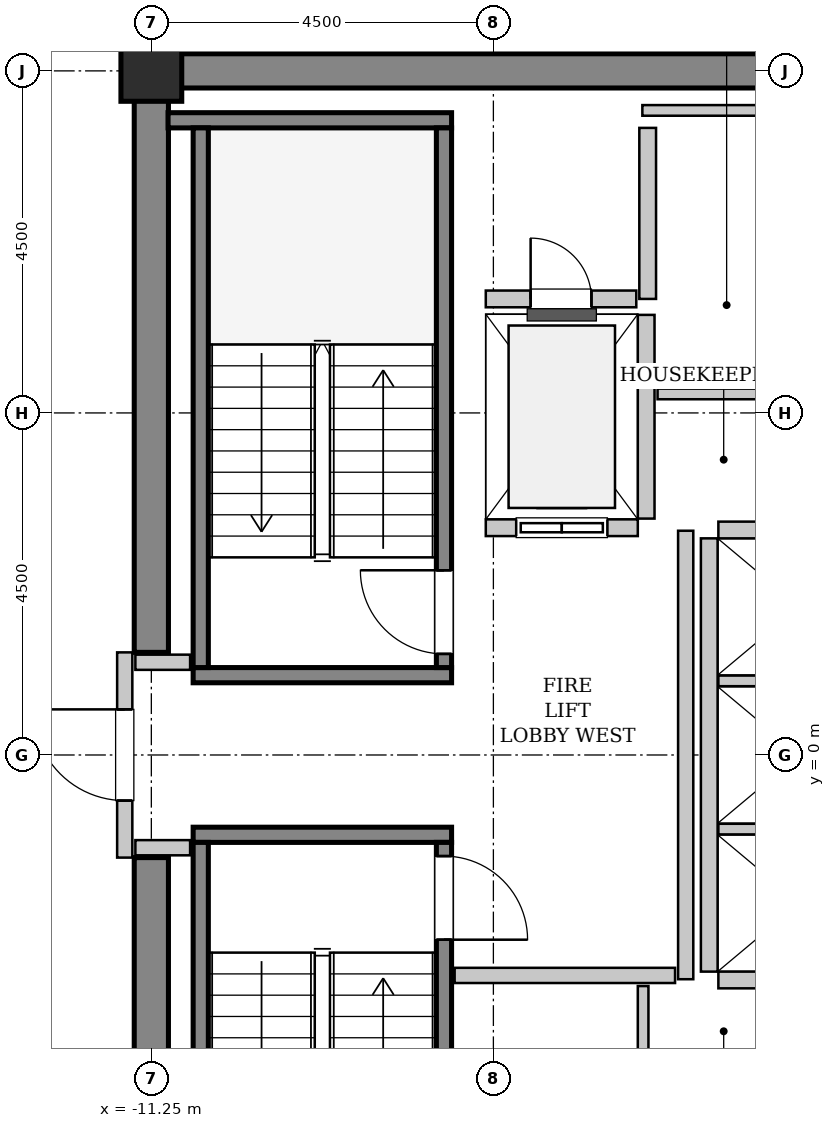
"""IFC4 building model, lengths in metres.
Left out: names, types, materials, properties, quantities, classifications, styles, units other than length and angle.
Written with IfcOpenShell. Run it as: python <this file> out.ifc"""

import sys

from ifc_helpers import new_model, si_unit, direction, frame, frame_2d, origin, origin_2d, place, context, subcontext, project, spatial, rectangle, hollow_rectangle, extrude, source, transform, mapped, element, fill, save


model = new_model("IFC4")
c1 = context("Model", 3, precision=1e-05, world=origin(), true_north=direction((0.0, 1.0)))
c2 = subcontext(c1, "Body", "Model", "MODEL_VIEW")
j1 = project(units=[si_unit("LENGTHUNIT", "METRE"), si_unit("PLANEANGLEUNIT", "RADIAN")], contexts=[c1])
p1 = place(None, origin())
s1 = spatial("IfcSite", under=j1, at=p1, CompositionType="ELEMENT")
p2 = place(p1, origin())
s2 = spatial("IfcBuilding", under=s1, at=p2, CompositionType="ELEMENT")
p3 = place(p2, frame((0.0, 0.0, 248.4)))
s3 = spatial("IfcBuildingStorey", under=s2, at=p3, CompositionType="ELEMENT", Elevation=248.4)
m1 = source(origin(), c2, "Body", "SweptSolid", [
    extrude(rectangle(XDim=9.925, YDim=0.45, at=frame_2d((4.962, 0.0))), origin(), (0.0, 0.0, 1.0), 3.8),
])
p4 = place(p3, frame((-11.475, 9.0, 0.0), z_axis=(0.0, 0.0, 1.0), x_axis=(1.0, 0.0, 0.0)))
e1 = element("IfcWall", 1, at=p4, inside=s3, PredefinedType="SHEAR", context=c2, shape_type="MappedRepresentation", body=[
    mapped(m1, transform((0.0, 0.0, 0.0), x_axis=(1.0, 0.0, 0.0), y_axis=(0.0, 1.0, 0.0), z_axis=(0.0, 0.0, 1.0), scale=1.0)),
])
m2 = source(origin(), c2, "Body", "SweptSolid", [
    extrude(rectangle(XDim=7.425, YDim=0.45, at=frame_2d((3.712, 0.0))), origin(), (0.0, 0.0, 1.0), 3.8),
])
for number, where, z_axis, x_axis in (
    (2, (-11.25, -8.775, 0.0), (0.0, 0.0, 1.0), (0.0, 1.0, 0.0)),
    (3, (-11.25, 1.35, 0.0), (0.0, 0.0, 1.0), (0.0, 1.0, 0.0)),
):
    element("IfcWall", number, at=place(p3, frame(where, z_axis=z_axis, x_axis=x_axis)), inside=s3, PredefinedType="SHEAR", context=c2, shape_type="MappedRepresentation", body=[
        mapped(m2, transform((0.0, 0.0, 0.0), x_axis=(1.0, 0.0, 0.0), y_axis=(0.0, 1.0, 0.0), z_axis=(0.0, 0.0, 1.0), scale=1.0)),
    ])
m3 = source(origin(), c2, "Body", "SweptSolid", [
    extrude(hollow_rectangle(XDim=0.8, YDim=0.8, WallThickness=0.04, InnerFilletRadius=0.04, OuterFilletRadius=0.08, at=origin_2d()), origin(), (0.0, 0.0, 1.0), 3.8),
])
p5 = place(p3, frame((-11.25, 9.0, 0.0), z_axis=(0.0, 0.0, 1.0), x_axis=(1.0, 0.0, 0.0)))
e4 = element("IfcColumn", 4, at=p5, inside=s3, PredefinedType="COLUMN", context=c2, shape_type="MappedRepresentation", body=[
    mapped(m3, transform((0.0, 0.0, 0.0), x_axis=(1.0, 0.0, 0.0), y_axis=(0.0, 1.0, 0.0), z_axis=(0.0, 0.0, 1.0), scale=1.0)),
])
m4 = source(origin(), c2, "Body", "SweptSolid", [
    extrude(rectangle(XDim=3.4, YDim=0.2, at=frame_2d((1.7, 0.0))), origin(), (0.0, 0.0, 1.0), 3.8),
])
p6 = place(p3, frame((-7.3, 1.05, 0.0), z_axis=(0.0, 0.0, 1.0), x_axis=(-1.0, 0.0, 0.0)))
e5 = element("IfcWall", 5, at=p6, inside=s3, PredefinedType="SOLIDWALL", context=c2, shape_type="MappedRepresentation", body=[
    mapped(m4, transform((0.0, 0.0, 0.0), x_axis=(1.0, 0.0, 0.0), y_axis=(0.0, 1.0, 0.0), z_axis=(0.0, 0.0, 1.0), scale=1.0)),
])
m5 = source(origin(), c2, "Body", "SweptSolid", [
    extrude(rectangle(XDim=3.73, YDim=0.2, at=frame_2d((1.865, 0.0))), origin(), (0.0, 0.0, 1.0), 3.8),
])
p7 = place(p3, frame((-7.3, 8.35, 0.0), z_axis=(0.0, 0.0, 1.0), x_axis=(-1.0, 0.0, 0.0)))
e6 = element("IfcWall", 6, at=p7, inside=s3, PredefinedType="SOLIDWALL", context=c2, shape_type="MappedRepresentation", body=[
    mapped(m5, transform((0.0, 0.0, 0.0), x_axis=(1.0, 0.0, 0.0), y_axis=(0.0, 1.0, 0.0), z_axis=(0.0, 0.0, 1.0), scale=1.0)),
])
m6 = source(origin(), c2, "Body", "SweptSolid", [
    extrude(rectangle(XDim=7.1, YDim=0.2, at=frame_2d((3.55, 0.0))), origin(), (0.0, 0.0, 1.0), 3.8),
])
p8 = place(p3, frame((-7.4, 1.15, 0.0), z_axis=(0.0, 0.0, 1.0), x_axis=(0.0, 1.0, 0.0)))
e7 = element("IfcWall", 7, at=p8, inside=s3, PredefinedType="SOLIDWALL", context=c2, shape_type="MappedRepresentation", body=[
    mapped(m6, transform((0.0, 0.0, 0.0), x_axis=(1.0, 0.0, 0.0), y_axis=(0.0, 1.0, 0.0), z_axis=(0.0, 0.0, 1.0), scale=1.0)),
])
p9 = place(p8, frame((0.18, 0.0, 0.0)))
e8 = element("IfcOpeningElement", 8, at=p9, cuts=e7, PredefinedType="OPENING", context=c2, shape_type="SweptSolid", body=[
    extrude(rectangle(XDim=1.1, YDim=2.15, at=frame_2d((0.55, 1.075))), frame((0.0, 0.11, 0.0), z_axis=(0.0, -1.0, 0.0), x_axis=(1.0, 0.0, 0.0)), (0.0, 0.0, 1.0), 0.22),
])
p10 = place(p3, frame((-10.6, 1.15, 0.0), z_axis=(0.0, 0.0, 1.0), x_axis=(0.0, 1.0, 0.0)))
e9 = element("IfcWall", 9, at=p10, inside=s3, PredefinedType="SOLIDWALL", context=c2, shape_type="MappedRepresentation", body=[
    mapped(m6, transform((0.0, 0.0, 0.0), x_axis=(1.0, 0.0, 0.0), y_axis=(0.0, 1.0, 0.0), z_axis=(0.0, 0.0, 1.0), scale=1.0)),
])
p11 = place(p3, frame((-10.7, -1.05, 0.0), z_axis=(0.0, 0.0, 1.0), x_axis=(1.0, 0.0, 0.0)))
e10 = element("IfcWall", 10, at=p11, inside=s3, PredefinedType="SOLIDWALL", context=c2, shape_type="MappedRepresentation", body=[
    mapped(m4, transform((0.0, 0.0, 0.0), x_axis=(1.0, 0.0, 0.0), y_axis=(0.0, 1.0, 0.0), z_axis=(0.0, 0.0, 1.0), scale=1.0)),
])
p12 = place(p3, frame((-10.6, -1.15, 0.0), z_axis=(0.0, 0.0, 1.0), x_axis=(0.0, -1.0, 0.0)))
e11 = element("IfcWall", 11, at=p12, inside=s3, PredefinedType="SOLIDWALL", context=c2, shape_type="MappedRepresentation", body=[
    mapped(m6, transform((0.0, 0.0, 0.0), x_axis=(1.0, 0.0, 0.0), y_axis=(0.0, 1.0, 0.0), z_axis=(0.0, 0.0, 1.0), scale=1.0)),
])
p13 = place(p3, frame((-7.4, -1.15, 0.0), z_axis=(0.0, 0.0, 1.0), x_axis=(0.0, -1.0, 0.0)))
e12 = element("IfcWall", 12, at=p13, inside=s3, PredefinedType="SOLIDWALL", context=c2, shape_type="MappedRepresentation", body=[
    mapped(m6, transform((0.0, 0.0, 0.0), x_axis=(1.0, 0.0, 0.0), y_axis=(0.0, 1.0, 0.0), z_axis=(0.0, 0.0, 1.0), scale=1.0)),
])
p14 = place(p13, frame((0.18, 0.0, 0.0)))
e13 = element("IfcOpeningElement", 13, at=p14, cuts=e12, PredefinedType="OPENING", context=c2, shape_type="SweptSolid", body=[
    extrude(rectangle(XDim=1.1, YDim=2.15, at=frame_2d((0.55, 1.075))), frame((0.0, 0.11, 0.0), z_axis=(0.0, -1.0, 0.0), x_axis=(1.0, 0.0, 0.0)), (0.0, 0.0, 1.0), 0.22),
])
m7 = source(origin(), c2, "Body", "SweptSolid", [
    extrude(rectangle(XDim=2.0, YDim=0.22, at=frame_2d((1.0, 0.0))), origin(), (0.0, 0.0, 1.0), 3.535),
])
p15 = place(p3, frame((-6.85, 2.99, 0.0), z_axis=(0.0, 0.0, 1.0), x_axis=(1.0, 0.0, 0.0)))
e14 = element("IfcWall", 14, at=p15, inside=s3, PredefinedType="SOLIDWALL", context=c2, shape_type="MappedRepresentation", body=[
    mapped(m7, transform((0.0, 0.0, 0.0), x_axis=(1.0, 0.0, 0.0), y_axis=(0.0, 1.0, 0.0), z_axis=(0.0, 0.0, 1.0), scale=1.0)),
])
p16 = place(p15, frame((0.4, 0.0, 0.0)))
e15 = element("IfcOpeningElement", 15, at=p16, cuts=e14, PredefinedType="OPENING", context=c2, shape_type="SweptSolid", body=[
    extrude(rectangle(XDim=1.2, YDim=2.2, at=frame_2d((0.6, 1.1))), frame((0.0, 0.12, 0.0), z_axis=(0.0, -1.0, 0.0), x_axis=(1.0, 0.0, 0.0)), (0.0, 0.0, 1.0), 0.24),
])
m8 = source(origin(), c2, "Body", "SweptSolid", [
    extrude(rectangle(XDim=2.68, YDim=0.22, at=frame_2d((1.34, 0.0))), origin(), (0.0, 0.0, 1.0), 3.535),
])
p17 = place(p3, frame((-4.74, 3.11, 0.0), z_axis=(0.0, 0.0, 1.0), x_axis=(0.0, 1.0, 0.0)))
e16 = element("IfcWall", 16, at=p17, inside=s3, PredefinedType="SOLIDWALL", context=c2, shape_type="MappedRepresentation", body=[
    mapped(m8, transform((0.0, 0.0, 0.0), x_axis=(1.0, 0.0, 0.0), y_axis=(0.0, 1.0, 0.0), z_axis=(0.0, 0.0, 1.0), scale=1.0)),
])
m9 = source(origin(), c2, "Body", "SweptSolid", [
    extrude(rectangle(XDim=5.7, YDim=0.22, at=frame_2d((2.85, 0.0))), origin(), (0.0, 0.0, 1.0), 3.535),
])
p18 = place(p3, frame((-3.91, 2.85, 0.0), z_axis=(0.0, 0.0, 1.0), x_axis=(0.0, -1.0, 0.0)))
e17 = element("IfcWall", 17, at=p18, inside=s3, PredefinedType="SOLIDWALL", context=c2, shape_type="MappedRepresentation", body=[
    mapped(m9, transform((0.0, 0.0, 0.0), x_axis=(1.0, 0.0, 0.0), y_axis=(0.0, 1.0, 0.0), z_axis=(0.0, 0.0, 1.0), scale=1.0)),
])
m10 = source(origin(), c2, "Body", "SweptSolid", [
    extrude(rectangle(XDim=2.13, YDim=0.22, at=frame_2d((1.065, 0.0))), origin(), (0.0, 0.0, 1.0), 3.535),
])
p19 = place(p3, frame((-3.79, -2.96, 0.0), z_axis=(0.0, 0.0, 1.0), x_axis=(1.0, 0.0, 0.0)))
e18 = element("IfcWall", 18, at=p19, inside=s3, PredefinedType="SOLIDWALL", context=c2, shape_type="MappedRepresentation", body=[
    mapped(m10, transform((0.0, 0.0, 0.0), x_axis=(1.0, 0.0, 0.0), y_axis=(0.0, 1.0, 0.0), z_axis=(0.0, 0.0, 1.0), scale=1.0)),
])
m11 = source(origin(), c2, "Body", "SweptSolid", [
    extrude(rectangle(XDim=2.13, YDim=0.14, at=frame_2d((1.065, 0.0))), origin(), (0.0, 0.0, 1.0), 3.535),
])
for number, where, z_axis, x_axis in (
    (19, (-3.79, -0.975, 0.0), (0.0, 0.0, 1.0), (1.0, 0.0, 0.0)),
    (20, (-3.79, 0.975, 0.0), (0.0, 0.0, 1.0), (1.0, 0.0, 0.0)),
):
    element("IfcWall", number, at=place(p3, frame(where, z_axis=z_axis, x_axis=x_axis)), inside=s3, PredefinedType="PARTITIONING", context=c2, shape_type="MappedRepresentation", body=[
        mapped(m11, transform((0.0, 0.0, 0.0), x_axis=(1.0, 0.0, 0.0), y_axis=(0.0, 1.0, 0.0), z_axis=(0.0, 0.0, 1.0), scale=1.0)),
    ])
p20 = place(p3, frame((-1.66, 2.96, 0.0), z_axis=(0.0, 0.0, 1.0), x_axis=(-1.0, 0.0, 0.0)))
e21 = element("IfcWall", 21, at=p20, inside=s3, PredefinedType="SOLIDWALL", context=c2, shape_type="MappedRepresentation", body=[
    mapped(m10, transform((0.0, 0.0, 0.0), x_axis=(1.0, 0.0, 0.0), y_axis=(0.0, 1.0, 0.0), z_axis=(0.0, 0.0, 1.0), scale=1.0)),
])
m12 = source(origin(), c2, "Body", "SweptSolid", [
    extrude(rectangle(XDim=2.25, YDim=0.22, at=frame_2d((1.125, 0.0))), origin(), (0.0, 0.0, 1.0), 3.535),
])
p21 = place(p3, frame((-4.72, 6.0, 0.0), z_axis=(0.0, 0.0, 1.0), x_axis=(0.0, 1.0, 0.0)))
e22 = element("IfcWall", 22, at=p21, inside=s3, PredefinedType="SOLIDWALL", context=c2, shape_type="MappedRepresentation", body=[
    mapped(m12, transform((0.0, 0.0, 0.0), x_axis=(1.0, 0.0, 0.0), y_axis=(0.0, 1.0, 0.0), z_axis=(0.0, 0.0, 1.0), scale=1.0)),
])
m13 = source(origin(), c2, "Body", "SweptSolid", [
    extrude(rectangle(XDim=1.98, YDim=0.22, at=frame_2d((0.99, 0.0))), origin(), (0.0, 0.0, 1.0), 3.535),
])
p22 = place(p3, frame((-6.85, 6.0, 0.0), z_axis=(0.0, 0.0, 1.0), x_axis=(1.0, 0.0, 0.0)))
e23 = element("IfcWall", 23, at=p22, inside=s3, PredefinedType="SOLIDWALL", context=c2, shape_type="MappedRepresentation", body=[
    mapped(m13, transform((0.0, 0.0, 0.0), x_axis=(1.0, 0.0, 0.0), y_axis=(0.0, 1.0, 0.0), z_axis=(0.0, 0.0, 1.0), scale=1.0)),
])
p23 = place(p22, frame((0.59, 0.0, 0.0)))
e24 = element("IfcOpeningElement", 24, at=p23, cuts=e23, PredefinedType="OPENING", context=c2, shape_type="SweptSolid", body=[
    extrude(rectangle(XDim=0.8, YDim=2.0, at=frame_2d((0.4, 1.0))), frame((0.0, 0.12, 0.0), z_axis=(0.0, -1.0, 0.0), x_axis=(1.0, 0.0, 0.0)), (0.0, 0.0, 1.0), 0.24),
])
m14 = source(origin(), c2, "Body", "SweptSolid", [
    extrude(rectangle(XDim=2.7, YDim=0.2, at=frame_2d((1.35, 0.0))), origin(), (0.0, 0.0, 1.0), 2.625),
])
p24 = place(p3, frame((-11.6, -1.35, 0.0), z_axis=(0.0, 0.0, 1.0), x_axis=(0.0, 1.0, 0.0)))
e25 = element("IfcWall", 25, at=p24, inside=s3, PredefinedType="PARTITIONING", context=c2, shape_type="MappedRepresentation", body=[
    mapped(m14, transform((0.0, 0.0, 0.0), x_axis=(1.0, 0.0, 0.0), y_axis=(0.0, 1.0, 0.0), z_axis=(0.0, 0.0, 1.0), scale=1.0)),
])
p25 = place(p24, frame((0.75, 0.0, 0.0)))
e26 = element("IfcOpeningElement", 26, at=p25, cuts=e25, PredefinedType="OPENING", context=c2, shape_type="SweptSolid", body=[
    extrude(rectangle(XDim=1.2, YDim=2.15, at=frame_2d((0.6, 1.075))), frame((0.0, 0.11, 0.0), z_axis=(0.0, -1.0, 0.0), x_axis=(1.0, 0.0, 0.0)), (0.0, 0.0, 1.0), 0.22),
])
m15 = source(origin(), c2, "Body", "SweptSolid", [
    extrude(rectangle(XDim=5.9, YDim=0.2, at=frame_2d((2.95, 0.0))), origin(), (0.0, 0.0, 1.0), 3.535),
])
p26 = place(p3, frame((-4.22, -2.95, 0.0), z_axis=(0.0, 0.0, 1.0), x_axis=(0.0, 1.0, 0.0)))
e27 = element("IfcWall", 27, at=p26, inside=s3, PredefinedType="PARTITIONING", context=c2, shape_type="MappedRepresentation", body=[
    mapped(m15, transform((0.0, 0.0, 0.0), x_axis=(1.0, 0.0, 0.0), y_axis=(0.0, 1.0, 0.0), z_axis=(0.0, 0.0, 1.0), scale=1.0)),
])
m16 = source(origin(), c2, "Body", "SweptSolid", [
    extrude(rectangle(XDim=2.9, YDim=0.2, at=frame_2d((1.45, 0.0))), origin(), (0.0, 0.0, 1.0), 3.535),
])
p27 = place(p3, frame((-7.26, -2.9, 0.0), z_axis=(0.0, 0.0, 1.0), x_axis=(1.0, 0.0, 0.0)))
e28 = element("IfcWall", 28, at=p27, inside=s3, PredefinedType="PARTITIONING", context=c2, shape_type="MappedRepresentation", body=[
    mapped(m16, transform((0.0, 0.0, 0.0), x_axis=(1.0, 0.0, 0.0), y_axis=(0.0, 1.0, 0.0), z_axis=(0.0, 0.0, 1.0), scale=1.0)),
])
m17 = source(origin(), c2, "Body", "SweptSolid", [
    extrude(rectangle(XDim=0.72, YDim=0.2, at=frame_2d((0.36, 0.0))), origin(), (0.0, 0.0, 1.0), 3.535),
])
for number, where, z_axis, x_axis in (
    (29, (-11.46, 1.22, 0.0), (0.0, 0.0, 1.0), (1.0, 0.0, 0.0)),
    (30, (-11.46, -1.22, 0.0), (0.0, 0.0, 1.0), (1.0, 0.0, 0.0)),
):
    element("IfcWall", number, at=place(p3, frame(where, z_axis=z_axis, x_axis=x_axis)), inside=s3, PredefinedType="PARTITIONING", context=c2, shape_type="MappedRepresentation", body=[
        mapped(m17, transform((0.0, 0.0, 0.0), x_axis=(1.0, 0.0, 0.0), y_axis=(0.0, 1.0, 0.0), z_axis=(0.0, 0.0, 1.0), scale=1.0)),
    ])
m18 = source(origin(), c2, "Body", "SweptSolid", [
    extrude(rectangle(XDim=2.95, YDim=0.14, at=frame_2d((1.475, 0.0))), origin(), (0.0, 0.0, 1.0), 3.535),
])
p28 = place(p3, frame((-4.59, 4.75, 0.0), z_axis=(0.0, 0.0, 1.0), x_axis=(1.0, 0.0, 0.0)))
e31 = element("IfcWall", 31, at=p28, inside=s3, PredefinedType="PARTITIONING", context=c2, shape_type="MappedRepresentation", body=[
    mapped(m18, transform((0.0, 0.0, 0.0), x_axis=(1.0, 0.0, 0.0), y_axis=(0.0, 1.0, 0.0), z_axis=(0.0, 0.0, 1.0), scale=1.0)),
])
m19 = source(origin(), c2, "Body", "SweptSolid", [
    extrude(rectangle(XDim=3.15, YDim=0.14, at=frame_2d((1.575, 0.0))), origin(), (0.0, 0.0, 1.0), 3.535),
])
p29 = place(p3, frame((-4.79, 8.48, 0.0), z_axis=(0.0, 0.0, 1.0), x_axis=(1.0, 0.0, 0.0)))
e32 = element("IfcWall", 32, at=p29, inside=s3, PredefinedType="PARTITIONING", context=c2, shape_type="MappedRepresentation", body=[
    mapped(m19, transform((0.0, 0.0, 0.0), x_axis=(1.0, 0.0, 0.0), y_axis=(0.0, 1.0, 0.0), z_axis=(0.0, 0.0, 1.0), scale=1.0)),
])
m20 = source(origin(), c2, "Body", "SweptSolid", [
    extrude(rectangle(XDim=1.1, YDim=0.14, at=frame_2d((0.55, 0.0))), origin(), (0.0, 0.0, 1.0), 3.535),
])
p30 = place(p3, frame((-4.78, -4.14, 0.0), z_axis=(0.0, 0.0, 1.0), x_axis=(0.0, 1.0, 0.0)))
e33 = element("IfcWall", 33, at=p30, inside=s3, PredefinedType="PARTITIONING", context=c2, shape_type="MappedRepresentation", body=[
    mapped(m20, transform((0.0, 0.0, 0.0), x_axis=(1.0, 0.0, 0.0), y_axis=(0.0, 1.0, 0.0), z_axis=(0.0, 0.0, 1.0), scale=1.0)),
])
m21 = source(origin(), c2, "Body", "SweptSolid", [
    extrude(rectangle(XDim=1.1, YDim=2.15, at=frame_2d((0.55, 1.075))), frame((0.0, 0.025, 0.0), z_axis=(0.0, -1.0, 0.0), x_axis=(1.0, 0.0, 0.0)), (0.0, 0.0, 1.0), 0.05),
])
p31 = place(p9, origin())
e34 = element("IfcDoor", 34, at=p31, inside=s3, OperationType="SINGLE_SWING_RIGHT", PredefinedType="DOOR", context=c2, shape_type="MappedRepresentation", body=[
    mapped(m21, transform((0.0, 0.0, 0.0), x_axis=(1.0, 0.0, 0.0), y_axis=(0.0, 1.0, 0.0), z_axis=(0.0, 0.0, 1.0), scale=1.0)),
])
fill(e8, e34)
p32 = place(p14, origin())
e35 = element("IfcDoor", 35, at=p32, inside=s3, OperationType="SINGLE_SWING_RIGHT", PredefinedType="DOOR", context=c2, shape_type="MappedRepresentation", body=[
    mapped(m21, transform((0.0, 0.0, 0.0), x_axis=(1.0, 0.0, 0.0), y_axis=(0.0, 1.0, 0.0), z_axis=(0.0, 0.0, 1.0), scale=1.0)),
])
fill(e13, e35)
m22 = source(origin(), c2, "Body", "SweptSolid", [
    extrude(rectangle(XDim=1.2, YDim=2.2, at=frame_2d((0.6, 1.1))), frame((0.0, 0.025, 0.0), z_axis=(0.0, -1.0, 0.0), x_axis=(1.0, 0.0, 0.0)), (0.0, 0.0, 1.0), 0.05),
])
p33 = place(p16, origin())
e36 = element("IfcDoor", 36, at=p33, inside=s3, OperationType="SLIDING_TO_LEFT", PredefinedType="DOOR", context=c2, shape_type="MappedRepresentation", body=[
    mapped(m22, transform((0.0, 0.0, 0.0), x_axis=(1.0, 0.0, 0.0), y_axis=(0.0, 1.0, 0.0), z_axis=(0.0, 0.0, 1.0), scale=1.0)),
])
fill(e15, e36)
m23 = source(origin(), c2, "Body", "SweptSolid", [
    extrude(rectangle(XDim=0.8, YDim=2.0, at=frame_2d((0.4, 1.0))), frame((0.0, 0.025, 0.0), z_axis=(0.0, -1.0, 0.0), x_axis=(1.0, 0.0, 0.0)), (0.0, 0.0, 1.0), 0.05),
])
p34 = place(p23, origin())
e37 = element("IfcDoor", 37, at=p34, inside=s3, OperationType="SINGLE_SWING_LEFT", PredefinedType="TRAPDOOR", context=c2, shape_type="MappedRepresentation", body=[
    mapped(m23, transform((0.0, 0.0, 0.0), x_axis=(1.0, 0.0, 0.0), y_axis=(0.0, 1.0, 0.0), z_axis=(0.0, 0.0, 1.0), scale=1.0)),
])
fill(e24, e37)
m24 = source(origin(), c2, "Body", "SweptSolid", [
    extrude(rectangle(XDim=1.2, YDim=2.15, at=frame_2d((0.6, 1.075))), frame((0.0, 0.025, 0.0), z_axis=(0.0, -1.0, 0.0), x_axis=(1.0, 0.0, 0.0)), (0.0, 0.0, 1.0), 0.05),
])
p35 = place(p25, origin())
e38 = element("IfcDoor", 38, at=p35, inside=s3, OperationType="SINGLE_SWING_RIGHT", PredefinedType="DOOR", context=c2, shape_type="MappedRepresentation", body=[
    mapped(m24, transform((0.0, 0.0, 0.0), x_axis=(1.0, 0.0, 0.0), y_axis=(0.0, 1.0, 0.0), z_axis=(0.0, 0.0, 1.0), scale=1.0)),
])
fill(e26, e38)
save(model, sys.argv[1])
